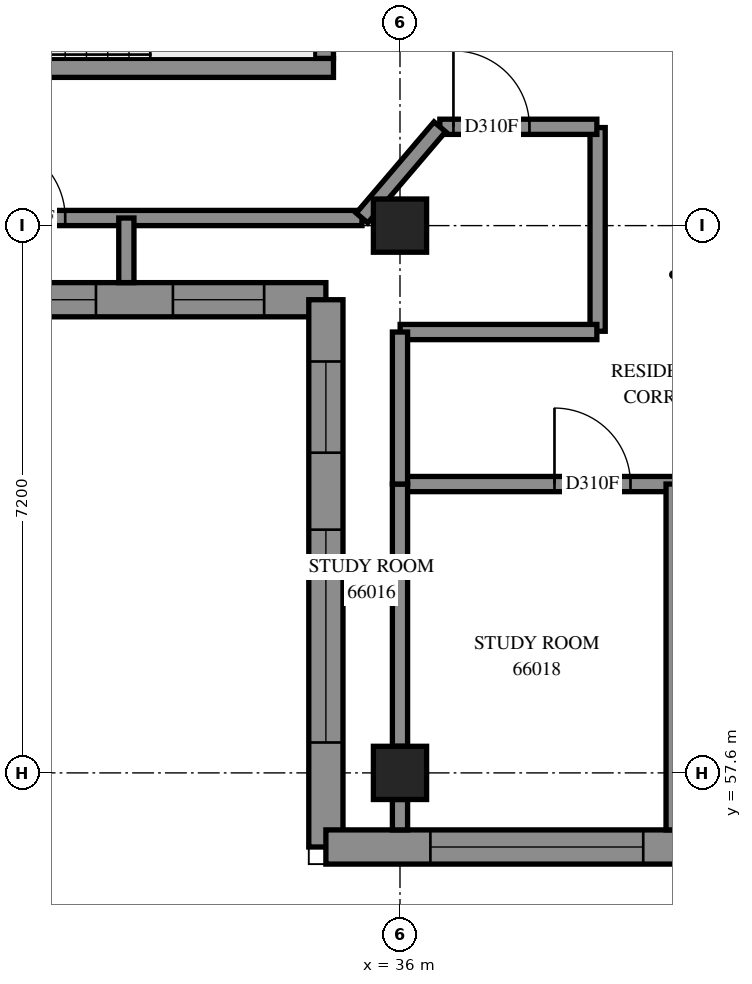
"""IFC4 building model, lengths in metres.
Left out: names, types, materials, properties, quantities, classifications, styles, units other than length and angle.
Written with IfcOpenShell. Run it as: python <this file> out.ifc"""

import sys

from ifc_helpers import new_model, si_unit, direction, frame, frame_2d, origin, origin_2d, place, context, subcontext, project, spatial, polyline, rectangle, outline, extrude, element, fill, save


model = new_model("IFC4")
c1 = context("Model", 3, precision=1e-05, world=origin(), true_north=direction((0.0, 1.0)))
c2 = subcontext(c1, "Body", "Model", "MODEL_VIEW")
j1 = project(units=[si_unit("LENGTHUNIT", "METRE"), si_unit("PLANEANGLEUNIT", "RADIAN")], contexts=[c1])
p1 = place(None, origin())
s1 = spatial("IfcSite", under=j1, at=p1, CompositionType="ELEMENT")
p2 = place(p1, origin())
s2 = spatial("IfcBuilding", under=s1, at=p2, CompositionType="ELEMENT")
p3 = place(p2, frame((0.0, 0.0, 243.8)))
s3 = spatial("IfcBuildingStorey", under=s2, at=p3, CompositionType="ELEMENT", Elevation=243.8)
for number, where, z_axis, x_axis in (
    (1, (36.0, 57.6, 0.0), (0.0, 0.0, 1.0), (1.0, 0.0, 0.0)),
    (2, (36.0, 64.8, 0.0), (0.0, 0.0, 1.0), (1.0, 0.0, 0.0)),
):
    element("IfcColumn", number, at=place(p3, frame(where, z_axis=z_axis, x_axis=x_axis)), inside=s3, PredefinedType="COLUMN", context=c2, shape_type="SweptSolid", body=[
        extrude(rectangle(XDim=0.7, YDim=0.7, at=origin_2d()), origin(), (0.0, 0.0, 1.0), 3.1),
    ])
p4 = place(p3, frame((26.925, 63.825, 0.0), z_axis=(0.0, 0.0, 1.0), x_axis=(1.0, 0.0, 0.0)))
e3 = element("IfcWall", 3, at=p4, inside=s3, PredefinedType="SOLIDWALL", context=c2, shape_type="SweptSolid", body=[
    extrude(outline(polyline([(-0.225, -0.225), (7.875, -0.225), (8.325, 0.225), (0.225, 0.225), (-0.225, -0.225)])), origin(), (0.0, 0.0, 1.0), 3.1),
])
p5 = place(p4, frame((2.275, 0.0, 0.45)))
e4 = element("IfcOpeningElement", 4, at=p5, cuts=e3, PredefinedType="OPENING", context=c2, shape_type="SweptSolid", body=[
    extrude(rectangle(XDim=2.8, YDim=2.55, at=frame_2d((1.4, 1.275))), frame((0.0, 0.235, 0.0), z_axis=(0.0, -1.0, 0.0), x_axis=(1.0, 0.0, 0.0)), (0.0, 0.0, 1.0), 0.47),
])
p6 = place(p4, frame((0.55, 0.0, 0.45)))
e5 = element("IfcOpeningElement", 5, at=p6, cuts=e3, PredefinedType="OPENING", context=c2, shape_type="SweptSolid", body=[
    extrude(rectangle(XDim=1.2, YDim=2.55, at=frame_2d((0.6, 1.275))), frame((0.0, 0.235, 0.0), z_axis=(0.0, -1.0, 0.0), x_axis=(1.0, 0.0, 0.0)), (0.0, 0.0, 1.0), 0.47),
])
p7 = place(p4, frame((6.088, 0.0, 0.45)))
e6 = element("IfcOpeningElement", 6, at=p7, cuts=e3, PredefinedType="OPENING", context=c2, shape_type="SweptSolid", body=[
    extrude(rectangle(XDim=1.2, YDim=2.55, at=frame_2d((0.6, 1.275))), frame((0.0, 0.235, 0.0), z_axis=(0.0, -1.0, 0.0), x_axis=(1.0, 0.0, 0.0)), (0.0, 0.0, 1.0), 0.47),
])
p8 = place(p3, frame((35.025, 63.825, 0.0), z_axis=(0.0, 0.0, 1.0), x_axis=(0.0, -1.0, 0.0)))
e7 = element("IfcWall", 7, at=p8, inside=s3, PredefinedType="SOLIDWALL", context=c2, shape_type="SweptSolid", body=[
    extrude(outline(polyline([(0.225, -0.225), (7.425, -0.225), (6.975, 0.225), (-0.225, 0.225), (0.225, -0.225)])), origin(), (0.0, 0.0, 1.0), 3.1),
])
p9 = place(p8, frame((3.025, 0.0, 0.45)))
e8 = element("IfcOpeningElement", 8, at=p9, cuts=e7, PredefinedType="OPENING", context=c2, shape_type="SweptSolid", body=[
    extrude(rectangle(XDim=2.8, YDim=2.55, at=frame_2d((1.4, 1.275))), frame((0.0, 0.235, 0.0), z_axis=(0.0, -1.0, 0.0), x_axis=(1.0, 0.0, 0.0)), (0.0, 0.0, 1.0), 0.47),
])
p10 = place(p8, frame((0.812, 0.0, 0.45)))
e9 = element("IfcOpeningElement", 9, at=p10, cuts=e7, PredefinedType="OPENING", context=c2, shape_type="SweptSolid", body=[
    extrude(rectangle(XDim=1.2, YDim=2.55, at=frame_2d((0.6, 1.275))), frame((0.0, 0.235, 0.0), z_axis=(0.0, -1.0, 0.0), x_axis=(1.0, 0.0, 0.0)), (0.0, 0.0, 1.0), 0.47),
])
p11 = place(p3, frame((35.025, 56.625, 0.0), z_axis=(0.0, 0.0, 1.0), x_axis=(1.0, 0.0, 0.0)))
e10 = element("IfcWall", 10, at=p11, inside=s3, PredefinedType="SOLIDWALL", context=c2, shape_type="SweptSolid", body=[
    extrude(outline(polyline([(-0.225, -0.225), (6.975, -0.225), (7.425, 0.225), (0.225, 0.225), (-0.225, -0.225)])), origin(), (0.0, 0.0, 1.0), 3.1),
])
p12 = place(p11, frame((1.375, 0.0, 0.45)))
e11 = element("IfcOpeningElement", 11, at=p12, cuts=e10, PredefinedType="OPENING", context=c2, shape_type="SweptSolid", body=[
    extrude(rectangle(XDim=2.8, YDim=2.55, at=frame_2d((1.4, 1.275))), frame((0.0, 0.235, 0.0), z_axis=(0.0, -1.0, 0.0), x_axis=(1.0, 0.0, 0.0)), (0.0, 0.0, 1.0), 0.47),
])
p13 = place(p11, frame((5.188, 0.0, 0.45)))
e12 = element("IfcOpeningElement", 12, at=p13, cuts=e10, PredefinedType="OPENING", context=c2, shape_type="SweptSolid", body=[
    extrude(rectangle(XDim=1.2, YDim=2.55, at=frame_2d((0.6, 1.275))), frame((0.0, 0.235, 0.0), z_axis=(0.0, -1.0, 0.0), x_axis=(1.0, 0.0, 0.0)), (0.0, 0.0, 1.0), 0.47),
])
p14 = place(p3, frame((28.875, 66.875, -0.3), z_axis=(0.0, 0.0, 1.0), x_axis=(1.0, 0.0, 0.0)))
e13 = element("IfcWall", 13, at=p14, inside=s3, PredefinedType="SOLIDWALL", context=c2, shape_type="SweptSolid", body=[
    extrude(rectangle(XDim=6.25, YDim=0.25, at=frame_2d((3.125, 0.0))), origin(), (0.0, 0.0, 1.0), 3.4),
])
p15 = place(p14, frame((0.525, 0.0, 0.3)))
e14 = element("IfcOpeningElement", 14, at=p15, cuts=e13, PredefinedType="OPENING", context=c2, shape_type="SweptSolid", body=[
    extrude(rectangle(XDim=0.8, YDim=2.1, at=frame_2d((0.4, 1.05))), frame((0.0, 0.135, 0.0), z_axis=(0.0, -1.0, 0.0), x_axis=(1.0, 0.0, 0.0)), (0.0, 0.0, 1.0), 0.27),
])
p16 = place(p3, frame((35.0, 67.0, -0.3), z_axis=(0.0, 0.0, 1.0), x_axis=(0.0, 1.0, 0.0)))
e15 = element("IfcWall", 15, at=p16, inside=s3, PredefinedType="SOLIDWALL", context=c2, shape_type="SweptSolid", body=[
    extrude(rectangle(XDim=2.85, YDim=0.25, at=frame_2d((1.425, 0.0))), origin(), (0.0, 0.0, 1.0), 3.4),
])
p17 = place(p3, frame((36.0, 61.4, 0.0), z_axis=(0.0, 0.0, 1.0), x_axis=(1.0, 0.0, 0.0)))
e16 = element("IfcWall", 16, at=p17, inside=s3, PredefinedType="PARTITIONING", context=c2, shape_type="SweptSolid", body=[
    extrude(rectangle(XDim=17.0, YDim=0.2, at=frame_2d((8.5, 0.0))), origin(), (0.0, 0.0, 1.0), 3.1),
])
p18 = place(p17, frame((2.033, 0.0, 0.0)))
e17 = element("IfcOpeningElement", 17, at=p18, cuts=e16, PredefinedType="OPENING", context=c2, shape_type="SweptSolid", body=[
    extrude(rectangle(XDim=1.0, YDim=2.1, at=frame_2d((0.5, 1.05))), frame((0.0, 0.11, 0.0), z_axis=(0.0, -1.0, 0.0), x_axis=(1.0, 0.0, 0.0)), (0.0, 0.0, 1.0), 0.22),
])
p19 = place(p17, frame((4.107, 0.0, 0.0)))
e18 = element("IfcOpeningElement", 18, at=p19, cuts=e16, PredefinedType="OPENING", context=c2, shape_type="SweptSolid", body=[
    extrude(rectangle(XDim=1.0, YDim=2.1, at=frame_2d((0.5, 1.05))), frame((0.0, 0.11, 0.0), z_axis=(0.0, -1.0, 0.0), x_axis=(1.0, 0.0, 0.0)), (0.0, 0.0, 1.0), 0.22),
])
p20 = place(p17, frame((9.232, 0.0, 0.0)))
e19 = element("IfcOpeningElement", 19, at=p20, cuts=e16, PredefinedType="OPENING", context=c2, shape_type="SweptSolid", body=[
    extrude(rectangle(XDim=1.0, YDim=2.1, at=frame_2d((0.5, 1.05))), frame((0.0, 0.11, 0.0), z_axis=(0.0, -1.0, 0.0), x_axis=(1.0, 0.0, 0.0)), (0.0, 0.0, 1.0), 0.22),
])
p21 = place(p17, frame((11.48, 0.0, 0.0)))
e20 = element("IfcOpeningElement", 20, at=p21, cuts=e16, PredefinedType="OPENING", context=c2, shape_type="SweptSolid", body=[
    extrude(rectangle(XDim=1.0, YDim=2.1, at=frame_2d((0.5, 1.05))), frame((0.0, 0.11, 0.0), z_axis=(0.0, -1.0, 0.0), x_axis=(1.0, 0.0, 0.0)), (0.0, 0.0, 1.0), 0.22),
])
p22 = place(p17, frame((15.805, 0.0, 0.0)))
e21 = element("IfcOpeningElement", 21, at=p22, cuts=e16, PredefinedType="OPENING", context=c2, shape_type="SweptSolid", body=[
    extrude(rectangle(XDim=1.0, YDim=2.1, at=frame_2d((0.5, 1.05))), frame((0.0, 0.11, 0.0), z_axis=(0.0, -1.0, 0.0), x_axis=(1.0, 0.0, 0.0)), (0.0, 0.0, 1.0), 0.22),
])
p23 = place(p3, frame((29.15, 64.9, 0.0), z_axis=(0.0, 0.0, 1.0), x_axis=(1.0, 0.0, 0.0)))
e22 = element("IfcWall", 22, at=p23, inside=s3, PredefinedType="PARTITIONING", context=c2, shape_type="SweptSolid", body=[
    extrude(rectangle(XDim=6.35, YDim=0.2, at=frame_2d((3.175, 0.0))), origin(), (0.0, 0.0, 1.0), 2.6),
])
p24 = place(p23, frame((1.446, 0.0, 0.0)))
e23 = element("IfcOpeningElement", 23, at=p24, cuts=e22, PredefinedType="OPENING", context=c2, shape_type="SweptSolid", body=[
    extrude(rectangle(XDim=1.0, YDim=2.1, at=frame_2d((0.5, 1.05))), frame((0.0, 0.11, 0.0), z_axis=(0.0, -1.0, 0.0), x_axis=(1.0, 0.0, 0.0)), (0.0, 0.0, 1.0), 0.22),
])
p25 = place(p3, frame((39.6, 56.85, 0.0), z_axis=(0.0, 0.0, 1.0), x_axis=(0.0, 1.0, 0.0)))
e24 = element("IfcWall", 24, at=p25, inside=s3, PredefinedType="PARTITIONING", context=c2, shape_type="SweptSolid", body=[
    extrude(rectangle(XDim=4.55, YDim=0.2, at=frame_2d((2.275, 0.0))), origin(), (0.0, 0.0, 1.0), 3.1),
])
p26 = place(p3, frame((36.0, 57.95, 0.0), z_axis=(0.0, 0.0, 1.0), x_axis=(0.0, 1.0, 0.0)))
e25 = element("IfcWall", 25, at=p26, inside=s3, PredefinedType="PARTITIONING", context=c2, shape_type="SweptSolid", body=[
    extrude(rectangle(XDim=3.45, YDim=0.2, at=frame_2d((1.725, 0.0))), origin(), (0.0, 0.0, 1.0), 2.6),
])
p27 = place(p3, frame((38.6, 63.41, 0.0), z_axis=(0.0, 0.0, 1.0), x_axis=(0.0, 1.0, 0.0)))
e26 = element("IfcWall", 26, at=p27, inside=s3, PredefinedType="PARTITIONING", context=c2, shape_type="SweptSolid", body=[
    extrude(rectangle(XDim=2.68, YDim=0.2, at=frame_2d((1.34, 0.0))), origin(), (0.0, 0.0, 1.0), 3.1),
])
p28 = place(p3, frame((36.002, 63.4, 0.0), z_axis=(0.0, 0.0, 1.0), x_axis=(1.0, 0.0, 0.0)))
e27 = element("IfcWall", 27, at=p28, inside=s3, PredefinedType="PARTITIONING", context=c2, shape_type="SweptSolid", body=[
    extrude(rectangle(XDim=2.588, YDim=0.2, at=frame_2d((1.294, 0.0))), origin(), (0.0, 0.0, 1.0), 3.1),
])
p29 = place(p3, frame((36.524, 66.1, 0.0), z_axis=(0.0, 0.0, 1.0), x_axis=(1.0, 0.0, 0.0)))
e28 = element("IfcWall", 28, at=p29, inside=s3, PredefinedType="PARTITIONING", context=c2, shape_type="SweptSolid", body=[
    extrude(rectangle(XDim=2.066, YDim=0.2, at=frame_2d((1.033, 0.0))), origin(), (0.0, 0.0, 1.0), 3.1),
])
p30 = place(p29, frame((0.179, 0.0, 0.0)))
e29 = element("IfcOpeningElement", 29, at=p30, cuts=e28, PredefinedType="OPENING", context=c2, shape_type="SweptSolid", body=[
    extrude(rectangle(XDim=1.0, YDim=2.1, at=frame_2d((0.5, 1.05))), frame((0.0, 0.11, 0.0), z_axis=(0.0, -1.0, 0.0), x_axis=(1.0, 0.0, 0.0)), (0.0, 0.0, 1.0), 0.22),
])
p31 = place(p3, frame((36.0, 61.4, 0.0), z_axis=(0.0, 0.0, 1.0), x_axis=(0.0, 1.0, 0.0)))
e30 = element("IfcWall", 30, at=p31, inside=s3, PredefinedType="PARTITIONING", context=c2, shape_type="SweptSolid", body=[
    extrude(rectangle(XDim=2.0, YDim=0.2, at=frame_2d((1.0, 0.0))), origin(), (0.0, 0.0, 1.0), 2.6),
])
p32 = place(p3, frame((32.4, 64.05, 0.0), z_axis=(0.0, 0.0, 1.0), x_axis=(0.0, 1.0, 0.0)))
e31 = element("IfcWall", 31, at=p32, inside=s3, PredefinedType="PARTITIONING", context=c2, shape_type="SweptSolid", body=[
    extrude(rectangle(XDim=0.85, YDim=0.2, at=frame_2d((0.425, 0.0))), origin(), (0.0, 0.0, 1.0), 3.1),
])
p33 = place(p3, frame((36.0, 56.85, 0.0), z_axis=(0.0, 0.0, 1.0), x_axis=(0.0, 1.0, 0.0)))
e32 = element("IfcWall", 32, at=p33, inside=s3, PredefinedType="PARTITIONING", context=c2, shape_type="SweptSolid", body=[
    extrude(rectangle(XDim=0.4, YDim=0.2, at=frame_2d((0.2, 0.0))), origin(), (0.0, 0.0, 1.0), 3.1),
])
p34 = place(p3, frame((35.5, 64.9, 0.0), z_axis=(0.0, 0.0, 1.0), x_axis=(0.6491192707, 0.7606866453, 0.0)))
e33 = element("IfcWall", 33, at=p34, inside=s3, PredefinedType="PARTITIONING", context=c2, shape_type="SweptSolid", body=[
    extrude(rectangle(XDim=1.577, YDim=0.2, at=frame_2d((0.789, 0.0))), origin(), (0.0, 0.0, 1.0), 3.1),
])
p35 = place(p5, origin())
e34 = element("IfcWindow", 34, at=p35, inside=s3, PartitioningType="SINGLE_PANEL", PredefinedType="WINDOW", context=c2, shape_type="SweptSolid", body=[
    extrude(rectangle(XDim=2.8, YDim=2.55, at=frame_2d((1.4, 1.275))), frame((0.0, 0.205, 0.0), z_axis=(0.0, -1.0, 0.0), x_axis=(1.0, 0.0, 0.0)), (0.0, 0.0, 1.0), 0.06),
])
fill(e4, e34)
p36 = place(p7, origin())
e35 = element("IfcWindow", 35, at=p36, inside=s3, PartitioningType="SINGLE_PANEL", PredefinedType="WINDOW", context=c2, shape_type="SweptSolid", body=[
    extrude(rectangle(XDim=1.2, YDim=2.55, at=frame_2d((0.6, 1.275))), frame((0.0, 0.205, 0.0), z_axis=(0.0, -1.0, 0.0), x_axis=(1.0, 0.0, 0.0)), (0.0, 0.0, 1.0), 0.06),
])
fill(e6, e35)
p37 = place(p9, origin())
e36 = element("IfcWindow", 36, at=p37, inside=s3, PartitioningType="SINGLE_PANEL", PredefinedType="WINDOW", context=c2, shape_type="SweptSolid", body=[
    extrude(rectangle(XDim=2.8, YDim=2.55, at=frame_2d((1.4, 1.275))), frame((0.0, 0.205, 0.0), z_axis=(0.0, -1.0, 0.0), x_axis=(1.0, 0.0, 0.0)), (0.0, 0.0, 1.0), 0.06),
])
fill(e8, e36)
p38 = place(p10, origin())
e37 = element("IfcWindow", 37, at=p38, inside=s3, PartitioningType="SINGLE_PANEL", PredefinedType="WINDOW", context=c2, shape_type="SweptSolid", body=[
    extrude(rectangle(XDim=1.2, YDim=2.55, at=frame_2d((0.6, 1.275))), frame((0.0, 0.205, 0.0), z_axis=(0.0, -1.0, 0.0), x_axis=(1.0, 0.0, 0.0)), (0.0, 0.0, 1.0), 0.06),
])
fill(e9, e37)
p39 = place(p12, origin())
e38 = element("IfcWindow", 38, at=p39, inside=s3, PartitioningType="SINGLE_PANEL", PredefinedType="WINDOW", context=c2, shape_type="SweptSolid", body=[
    extrude(rectangle(XDim=2.8, YDim=2.55, at=frame_2d((1.4, 1.275))), frame((0.0, 0.205, 0.0), z_axis=(0.0, -1.0, 0.0), x_axis=(1.0, 0.0, 0.0)), (0.0, 0.0, 1.0), 0.06),
])
fill(e11, e38)
p40 = place(p24, origin())
e39 = element("IfcDoor", 39, at=p40, inside=s3, OperationType="SINGLE_SWING_RIGHT", PredefinedType="DOOR", context=c2, shape_type="SweptSolid", body=[
    extrude(rectangle(XDim=1.0, YDim=2.1, at=frame_2d((0.5, 1.05))), frame((0.0, 0.025, 0.0), z_axis=(0.0, -1.0, 0.0), x_axis=(1.0, 0.0, 0.0)), (0.0, 0.0, 1.0), 0.05),
])
fill(e23, e39)
p41 = place(p30, origin())
e40 = element("IfcDoor", 40, at=p41, inside=s3, OperationType="SINGLE_SWING_RIGHT", PredefinedType="DOOR", context=c2, shape_type="SweptSolid", body=[
    extrude(rectangle(XDim=1.0, YDim=2.1, at=frame_2d((0.5, 1.05))), frame((0.0, 0.025, 0.0), z_axis=(0.0, -1.0, 0.0), x_axis=(1.0, 0.0, 0.0)), (0.0, 0.0, 1.0), 0.05),
])
fill(e29, e40)
p42 = place(p18, origin())
e41 = element("IfcDoor", 41, at=p42, inside=s3, OperationType="SINGLE_SWING_LEFT", PredefinedType="DOOR", context=c2, shape_type="SweptSolid", body=[
    extrude(rectangle(XDim=1.0, YDim=2.1, at=frame_2d((0.5, 1.05))), frame((0.0, 0.025, 0.0), z_axis=(0.0, -1.0, 0.0), x_axis=(1.0, 0.0, 0.0)), (0.0, 0.0, 1.0), 0.05),
])
fill(e17, e41)
save(model, sys.argv[1])
